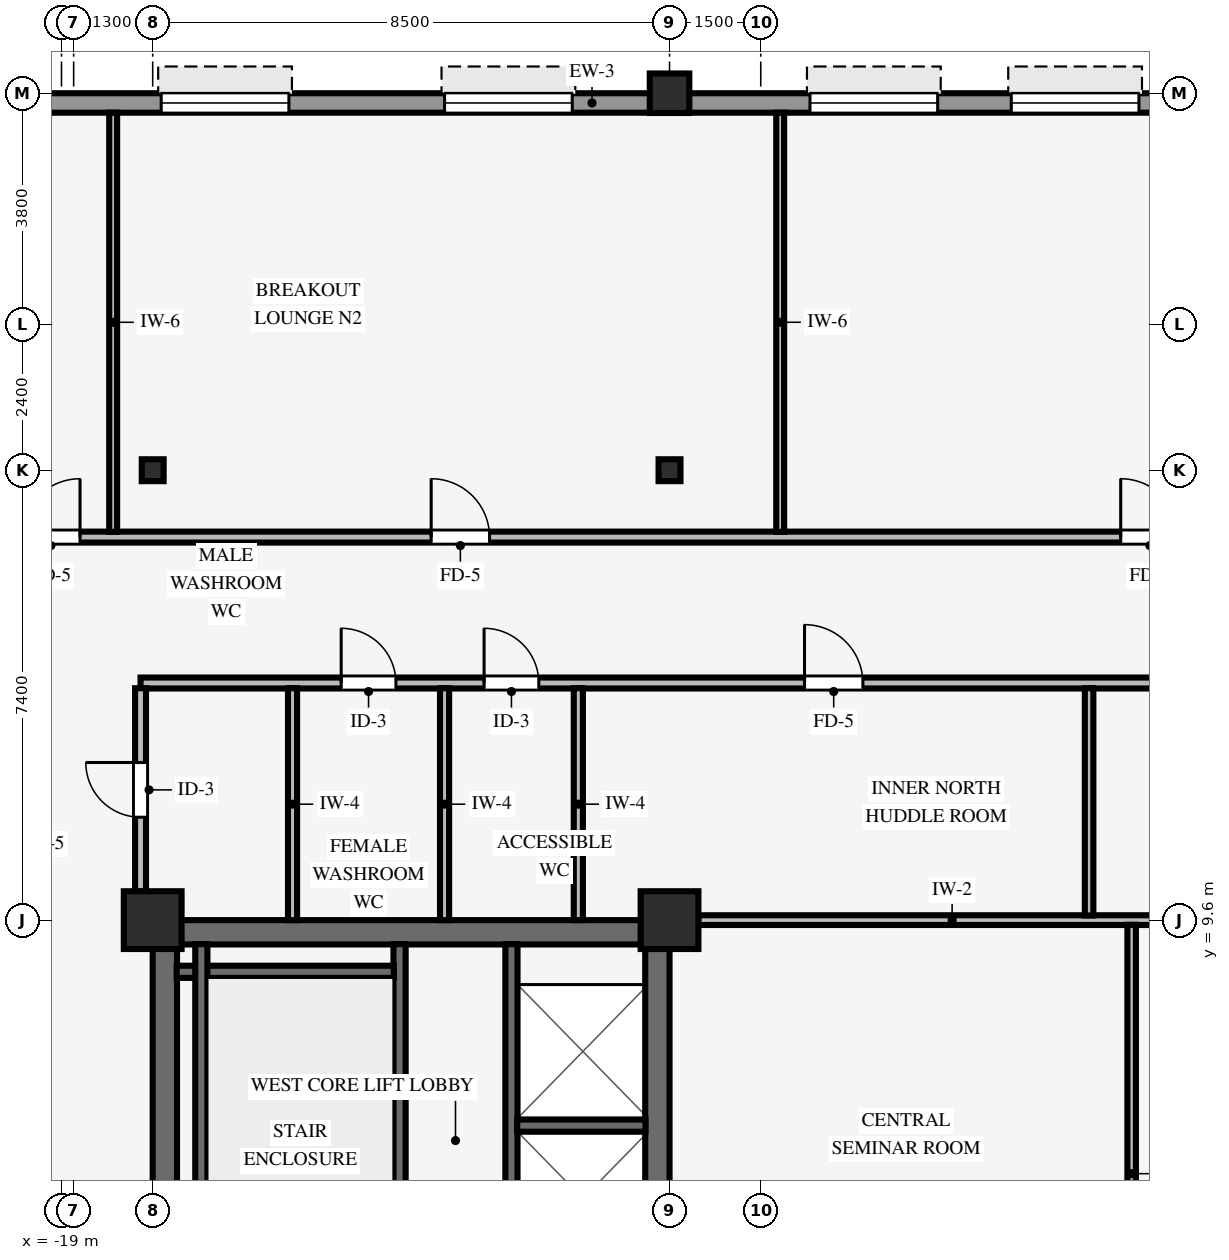
"""IFC4 building model, lengths in metres.
Left out: names, types, materials, properties, quantities, classifications, styles, units other than length and angle.
Written with IfcOpenShell. Run it as: python <this file> out.ifc"""

import sys

from ifc_helpers import new_model, si_unit, direction, frame, frame_2d, origin, origin_2d, place, context, subcontext, project, spatial, rectangle, hollow_rectangle, i_section, extrude, source, transform, mapped, element, fill, save


model = new_model("IFC4")
c1 = context("Model", 3, precision=1e-05, world=origin(), true_north=direction((0.0, 1.0)))
c2 = subcontext(c1, "Body", "Model", "MODEL_VIEW")
j1 = project(units=[si_unit("LENGTHUNIT", "METRE"), si_unit("PLANEANGLEUNIT", "RADIAN")], contexts=[c1])
p1 = place(None, origin())
s1 = spatial("IfcSite", under=j1, at=p1, CompositionType="ELEMENT")
p2 = place(p1, origin())
s2 = spatial("IfcBuilding", under=s1, at=p2, CompositionType="ELEMENT")
p3 = place(p2, frame((0.0, 0.0, 160.35)))
s3 = spatial("IfcBuildingStorey", under=s2, at=p3, CompositionType="ELEMENT", Elevation=160.35)
p4 = place(p3, frame((-17.5, 9.4, 0.0), z_axis=(0.0, 0.0, 1.0), x_axis=(1.0, 0.0, 0.0)))
e1 = element("IfcWall", 1, at=p4, inside=s3, PredefinedType="SHEAR", context=c2, shape_type="SweptSolid", body=[
    extrude(rectangle(XDim=8.5, YDim=0.4, at=frame_2d((4.25, 0.0))), origin(), (0.0, 0.0, 1.0), 3.37),
])
p5 = place(p3, frame((-17.3, -9.205, 0.0), z_axis=(0.0, 0.0, 1.0), x_axis=(0.0, 1.0, 0.0)))
e2 = element("IfcWall", 2, at=p5, inside=s3, PredefinedType="SHEAR", context=c2, shape_type="SweptSolid", body=[
    extrude(rectangle(XDim=18.41, YDim=0.4, at=frame_2d((9.205, 0.0))), origin(), (0.0, 0.0, 1.0), 3.37),
])
p6 = place(p3, frame((-9.2, -9.205, 0.0), z_axis=(0.0, 0.0, 1.0), x_axis=(0.0, 1.0, 0.0)))
e3 = element("IfcWall", 3, at=p6, inside=s3, PredefinedType="SHEAR", context=c2, shape_type="SweptSolid", body=[
    extrude(rectangle(XDim=18.41, YDim=0.4, at=frame_2d((9.205, 0.0))), origin(), (0.0, 0.0, 1.0), 3.37),
])
p7 = place(p6, frame((8.605, 0.0, 0.0)))
e4 = element("IfcOpeningElement", 4, at=p7, cuts=e3, PredefinedType="OPENING", context=c2, shape_type="SweptSolid", body=[
    extrude(rectangle(XDim=1.2, YDim=2.15, at=frame_2d((0.6, 1.075))), frame((0.0, 0.21, 0.0), z_axis=(0.0, -1.0, 0.0), x_axis=(1.0, 0.0, 0.0)), (0.0, 0.0, 1.0), 0.42),
])
for number, where, z_axis, x_axis in (
    (5, (-17.5, 9.6, 0.0), (0.0, 0.0, 1.0), (1.0, 0.0, 0.0)),
    (6, (-9.0, 9.6, 0.0), (0.0, 0.0, 1.0), (1.0, 0.0, 0.0)),
):
    element("IfcColumn", number, at=place(p3, frame(where, z_axis=z_axis, x_axis=x_axis)), inside=s3, PredefinedType="COLUMN", context=c2, shape_type="SweptSolid", body=[
        extrude(rectangle(XDim=0.95, YDim=0.95, at=origin_2d()), origin(), (0.0, 0.0, 1.0), 3.37),
    ])
p8 = place(p3, frame((-9.0, 23.2, 0.0), z_axis=(0.0, 0.0, 1.0), x_axis=(1.0, 0.0, 0.0)))
e7 = element("IfcColumn", 7, at=p8, inside=s3, PredefinedType="COLUMN", context=c2, shape_type="SweptSolid", body=[
    extrude(hollow_rectangle(XDim=0.65, YDim=0.65, WallThickness=0.04, InnerFilletRadius=0.04, OuterFilletRadius=0.08, at=origin_2d()), origin(), (0.0, 0.0, 1.0), 3.37),
])
for number, where, z_axis, x_axis in (
    (8, (-17.5, 17.0, 0.0), (0.0, 0.0, 1.0), (1.0, 0.0, 0.0)),
    (9, (-9.0, 17.0, 0.0), (0.0, 0.0, 1.0), (1.0, 0.0, 0.0)),
):
    element("IfcColumn", number, at=place(p3, frame(where, z_axis=z_axis, x_axis=x_axis)), inside=s3, PredefinedType="COLUMN", context=c2, shape_type="SweptSolid", body=[
        extrude(i_section(OverallWidth=0.36, OverallDepth=0.36, WebThickness=0.021, FlangeThickness=0.021, FilletRadius=0.018, at=origin_2d()), origin(), (0.0, 0.0, 1.0), 3.37),
    ])
p9 = place(p3, frame((-24.3, 23.04, 0.0), z_axis=(0.0, 0.0, 1.0), x_axis=(1.0, 0.0, 0.0)))
e10 = element("IfcWall", 10, at=p9, inside=s3, PredefinedType="STANDARD", context=c2, shape_type="SweptSolid", body=[
    extrude(rectangle(XDim=48.6, YDim=0.32, at=frame_2d((24.3, 0.0))), origin(), (0.0, 0.0, 1.0), 2.705),
])
p10 = place(p9, frame((28.5, 0.0, 0.0)))
e11 = element("IfcOpeningElement", 11, at=p10, cuts=e10, PredefinedType="OPENING", context=c2, shape_type="SweptSolid", body=[
    extrude(rectangle(XDim=1.05, YDim=2.1, at=frame_2d((0.525, 1.05))), frame((0.0, 0.17, 0.0), z_axis=(0.0, -1.0, 0.0), x_axis=(1.0, 0.0, 0.0)), (0.0, 0.0, 1.0), 0.34),
])
p11 = place(p9, frame((2.28, 0.0, 0.8)))
e12 = element("IfcOpeningElement", 12, at=p11, cuts=e10, PredefinedType="OPENING", context=c2, shape_type="SweptSolid", body=[
    extrude(rectangle(XDim=2.1, YDim=1.56, at=frame_2d((1.05, 0.78))), frame((0.0, 0.17, 0.0), z_axis=(0.0, -1.0, 0.0), x_axis=(1.0, 0.0, 0.0)), (0.0, 0.0, 1.0), 0.34),
])
p12 = place(p9, frame((6.94, 0.0, 0.8)))
e13 = element("IfcOpeningElement", 13, at=p12, cuts=e10, PredefinedType="OPENING", context=c2, shape_type="SweptSolid", body=[
    extrude(rectangle(XDim=2.1, YDim=1.56, at=frame_2d((1.05, 0.78))), frame((0.0, 0.17, 0.0), z_axis=(0.0, -1.0, 0.0), x_axis=(1.0, 0.0, 0.0)), (0.0, 0.0, 1.0), 0.34),
])
p13 = place(p9, frame((11.6, 0.0, 0.8)))
e14 = element("IfcOpeningElement", 14, at=p13, cuts=e10, PredefinedType="OPENING", context=c2, shape_type="SweptSolid", body=[
    extrude(rectangle(XDim=2.1, YDim=1.56, at=frame_2d((1.05, 0.78))), frame((0.0, 0.17, 0.0), z_axis=(0.0, -1.0, 0.0), x_axis=(1.0, 0.0, 0.0)), (0.0, 0.0, 1.0), 0.34),
])
p14 = place(p9, frame((17.61, 0.0, 0.8)))
e15 = element("IfcOpeningElement", 15, at=p14, cuts=e10, PredefinedType="OPENING", context=c2, shape_type="SweptSolid", body=[
    extrude(rectangle(XDim=2.1, YDim=1.56, at=frame_2d((1.05, 0.78))), frame((0.0, 0.17, 0.0), z_axis=(0.0, -1.0, 0.0), x_axis=(1.0, 0.0, 0.0)), (0.0, 0.0, 1.0), 0.34),
])
p15 = place(p9, frame((20.92, 0.0, 0.8)))
e16 = element("IfcOpeningElement", 16, at=p15, cuts=e10, PredefinedType="OPENING", context=c2, shape_type="SweptSolid", body=[
    extrude(rectangle(XDim=2.1, YDim=1.56, at=frame_2d((1.05, 0.78))), frame((0.0, 0.17, 0.0), z_axis=(0.0, -1.0, 0.0), x_axis=(1.0, 0.0, 0.0)), (0.0, 0.0, 1.0), 0.34),
])
p16 = place(p9, frame((25.58, 0.0, 0.8)))
e17 = element("IfcOpeningElement", 17, at=p16, cuts=e10, PredefinedType="OPENING", context=c2, shape_type="SweptSolid", body=[
    extrude(rectangle(XDim=2.1, YDim=1.56, at=frame_2d((1.05, 0.78))), frame((0.0, 0.17, 0.0), z_axis=(0.0, -1.0, 0.0), x_axis=(1.0, 0.0, 0.0)), (0.0, 0.0, 1.0), 0.34),
])
p17 = place(p9, frame((34.9, 0.0, 0.8)))
e18 = element("IfcOpeningElement", 18, at=p17, cuts=e10, PredefinedType="OPENING", context=c2, shape_type="SweptSolid", body=[
    extrude(rectangle(XDim=2.1, YDim=1.56, at=frame_2d((1.05, 0.78))), frame((0.0, 0.17, 0.0), z_axis=(0.0, -1.0, 0.0), x_axis=(1.0, 0.0, 0.0)), (0.0, 0.0, 1.0), 0.34),
])
p18 = place(p9, frame((39.56, 0.0, 0.8)))
e19 = element("IfcOpeningElement", 19, at=p18, cuts=e10, PredefinedType="OPENING", context=c2, shape_type="SweptSolid", body=[
    extrude(rectangle(XDim=2.1, YDim=1.56, at=frame_2d((1.05, 0.78))), frame((0.0, 0.17, 0.0), z_axis=(0.0, -1.0, 0.0), x_axis=(1.0, 0.0, 0.0)), (0.0, 0.0, 1.0), 0.34),
])
p19 = place(p9, frame((44.22, 0.0, 0.8)))
e20 = element("IfcOpeningElement", 20, at=p19, cuts=e10, PredefinedType="OPENING", context=c2, shape_type="SweptSolid", body=[
    extrude(rectangle(XDim=2.1, YDim=1.56, at=frame_2d((1.05, 0.78))), frame((0.0, 0.17, 0.0), z_axis=(0.0, -1.0, 0.0), x_axis=(1.0, 0.0, 0.0)), (0.0, 0.0, 1.0), 0.34),
])
p20 = place(p3, frame((-13.44, 0.9, 0.0), z_axis=(0.0, 0.0, 1.0), x_axis=(0.0, 1.0, 0.0)))
e21 = element("IfcWall", 21, at=p20, inside=s3, PredefinedType="SHEAR", context=c2, shape_type="SweptSolid", body=[
    extrude(rectangle(XDim=8.305, YDim=0.2, at=frame_2d((4.153, 0.0))), origin(), (0.0, 0.0, 1.0), 3.37),
])
p21 = place(p20, frame((1.53, 0.0, 0.0), z_axis=(0.0, 0.0, 1.0), x_axis=(-1.0, 0.0, 0.0)))
e22 = element("IfcOpeningElement", 22, at=p21, cuts=e21, PredefinedType="OPENING", context=c2, shape_type="SweptSolid", body=[
    extrude(rectangle(XDim=1.1, YDim=2.15, at=frame_2d((0.55, 1.075))), frame((0.0, 0.11, 0.0), z_axis=(0.0, -1.0, 0.0), x_axis=(1.0, 0.0, 0.0)), (0.0, 0.0, 1.0), 0.22),
])
p22 = place(p3, frame((-17.105, 8.75, 0.0), z_axis=(0.0, 0.0, 1.0), x_axis=(1.0, 0.0, 0.0)))
e23 = element("IfcWall", 23, at=p22, inside=s3, PredefinedType="SHEAR", context=c2, shape_type="SweptSolid", body=[
    extrude(rectangle(XDim=3.57, YDim=0.2, at=frame_2d((1.785, 0.0))), origin(), (0.0, 0.0, 1.0), 3.37),
])
p23 = place(p3, frame((-16.7, 1.095, 0.0), z_axis=(0.0, 0.0, 1.0), x_axis=(0.0, 1.0, 0.0)))
e24 = element("IfcWall", 24, at=p23, inside=s3, PredefinedType="SHEAR", context=c2, shape_type="SweptSolid", body=[
    extrude(rectangle(XDim=8.11, YDim=0.2, at=frame_2d((4.055, 0.0))), origin(), (0.0, 0.0, 1.0), 3.37),
])
p24 = place(p3, frame((-11.6, 1.3, 0.0), z_axis=(0.0, 0.0, 1.0), x_axis=(0.0, 1.0, 0.0)))
e25 = element("IfcWall", 25, at=p24, inside=s3, PredefinedType="SHEAR", context=c2, shape_type="SweptSolid", body=[
    extrude(rectangle(XDim=7.905, YDim=0.2, at=frame_2d((3.953, 0.0))), origin(), (0.0, 0.0, 1.0), 3.37),
])
p25 = place(p3, frame((-11.505, 6.22, 0.0), z_axis=(0.0, 0.0, 1.0), x_axis=(1.0, 0.0, 0.0)))
e26 = element("IfcWall", 26, at=p25, inside=s3, PredefinedType="SHEAR", context=c2, shape_type="SweptSolid", body=[
    extrude(rectangle(XDim=2.11, YDim=0.2, at=frame_2d((1.055, 0.0))), origin(), (0.0, 0.0, 1.0), 3.37),
])
p26 = place(p3, frame((-8.529, 9.6, 0.0), z_axis=(0.0, 0.0, 1.0), x_axis=(1.0, 0.0, 0.0)))
e27 = element("IfcWall", 27, at=p26, inside=s3, PredefinedType="PARTITIONING", context=c2, shape_type="SweptSolid", body=[
    extrude(rectangle(XDim=8.353, YDim=0.16, at=frame_2d((4.177, 0.0))), origin(), (0.0, 0.0, 1.0), 2.405),
])
p27 = place(p3, frame((-17.7, 13.5, 0.0), z_axis=(0.0, 0.0, 1.0), x_axis=(1.0, 0.0, 0.0)))
e28 = element("IfcWall", 28, at=p27, inside=s3, PredefinedType="PARTITIONING", context=c2, shape_type="SweptSolid", body=[
    extrude(rectangle(XDim=24.3, YDim=0.18, at=frame_2d((12.15, 0.0))), origin(), (0.0, 0.0, 1.0), 2.998),
])
p28 = place(p27, frame((19.47, 0.0, 0.0)))
e29 = element("IfcOpeningElement", 29, at=p28, cuts=e28, PredefinedType="OPENING", context=c2, shape_type="SweptSolid", body=[
    extrude(rectangle(XDim=0.96, YDim=2.1, at=frame_2d((0.48, 1.05))), frame((0.0, 0.1, 0.0), z_axis=(0.0, -1.0, 0.0), x_axis=(1.0, 0.0, 0.0)), (0.0, 0.0, 1.0), 0.2),
])
p29 = place(p27, frame((10.92, 0.0, 0.0)))
e30 = element("IfcOpeningElement", 30, at=p29, cuts=e28, PredefinedType="OPENING", context=c2, shape_type="SweptSolid", body=[
    extrude(rectangle(XDim=0.96, YDim=2.1, at=frame_2d((0.48, 1.05))), frame((0.0, 0.1, 0.0), z_axis=(0.0, -1.0, 0.0), x_axis=(1.0, 0.0, 0.0)), (0.0, 0.0, 1.0), 0.2),
])
p30 = place(p27, frame((3.3, 0.0, 0.0)))
e31 = element("IfcOpeningElement", 31, at=p30, cuts=e28, PredefinedType="OPENING", context=c2, shape_type="SweptSolid", body=[
    extrude(rectangle(XDim=0.9, YDim=2.1, at=frame_2d((0.45, 1.05))), frame((0.0, 0.1, 0.0), z_axis=(0.0, -1.0, 0.0), x_axis=(1.0, 0.0, 0.0)), (0.0, 0.0, 1.0), 0.2),
])
p31 = place(p27, frame((5.65, 0.0, 0.0)))
e32 = element("IfcOpeningElement", 32, at=p31, cuts=e28, PredefinedType="OPENING", context=c2, shape_type="SweptSolid", body=[
    extrude(rectangle(XDim=0.9, YDim=2.1, at=frame_2d((0.45, 1.05))), frame((0.0, 0.1, 0.0), z_axis=(0.0, -1.0, 0.0), x_axis=(1.0, 0.0, 0.0)), (0.0, 0.0, 1.0), 0.2),
])
p32 = place(p3, frame((-26.08, 15.9, 0.0), z_axis=(0.0, 0.0, 1.0), x_axis=(1.0, 0.0, 0.0)))
e33 = element("IfcWall", 33, at=p32, inside=s3, PredefinedType="PARTITIONING", context=c2, shape_type="SweptSolid", body=[
    extrude(rectangle(XDim=52.16, YDim=0.18, at=frame_2d((26.08, 0.0))), origin(), (0.0, 0.0, 1.0), 3.36),
])
p33 = place(p32, frame((24.5, 0.0, 0.0)))
e34 = element("IfcOpeningElement", 34, at=p33, cuts=e33, PredefinedType="OPENING", context=c2, shape_type="SweptSolid", body=[
    extrude(rectangle(XDim=0.96, YDim=2.1, at=frame_2d((0.48, 1.05))), frame((0.0, 0.1, 0.0), z_axis=(0.0, -1.0, 0.0), x_axis=(1.0, 0.0, 0.0)), (0.0, 0.0, 1.0), 0.2),
])
p34 = place(p32, frame((40.5, 0.0, 0.0)))
e35 = element("IfcOpeningElement", 35, at=p34, cuts=e33, PredefinedType="OPENING", context=c2, shape_type="SweptSolid", body=[
    extrude(rectangle(XDim=0.96, YDim=2.1, at=frame_2d((0.48, 1.05))), frame((0.0, 0.1, 0.0), z_axis=(0.0, -1.0, 0.0), x_axis=(1.0, 0.0, 0.0)), (0.0, 0.0, 1.0), 0.2),
])
p35 = place(p32, frame((13.16, 0.0, 0.0)))
e36 = element("IfcOpeningElement", 36, at=p35, cuts=e33, PredefinedType="OPENING", context=c2, shape_type="SweptSolid", body=[
    extrude(rectangle(XDim=0.96, YDim=2.1, at=frame_2d((0.48, 1.05))), frame((0.0, 0.1, 0.0), z_axis=(0.0, -1.0, 0.0), x_axis=(1.0, 0.0, 0.0)), (0.0, 0.0, 1.0), 0.2),
])
p36 = place(p32, frame((6.425, 0.0, 0.0)))
e37 = element("IfcOpeningElement", 37, at=p36, cuts=e33, PredefinedType="OPENING", context=c2, shape_type="SweptSolid", body=[
    extrude(rectangle(XDim=0.96, YDim=2.1, at=frame_2d((0.48, 1.05))), frame((0.0, 0.1, 0.0), z_axis=(0.0, -1.0, 0.0), x_axis=(1.0, 0.0, 0.0)), (0.0, 0.0, 1.0), 0.2),
])
p37 = place(p3, frame((-18.15, 15.986, 0.0), z_axis=(0.0, 0.0, 1.0), x_axis=(0.0, 1.0, 0.0)))
e38 = element("IfcWall", 38, at=p37, inside=s3, PredefinedType="PARTITIONING", context=c2, shape_type="SweptSolid", body=[
    extrude(rectangle(XDim=6.894, YDim=0.13, at=frame_2d((3.447, 0.0))), origin(), (0.0, 0.0, 1.0), 3.36),
])
p38 = place(p3, frame((-17.7, 10.071, 0.0), z_axis=(0.0, 0.0, 1.0), x_axis=(0.0, 1.0, 0.0)))
e39 = element("IfcWall", 39, at=p38, inside=s3, PredefinedType="PARTITIONING", context=c2, shape_type="SweptSolid", body=[
    extrude(rectangle(XDim=3.343, YDim=0.18, at=frame_2d((1.671, 0.0))), origin(), (0.0, 0.0, 1.0), 2.816),
])
p39 = place(p38, frame((1.221, 0.0, 0.0)))
e40 = element("IfcOpeningElement", 40, at=p39, cuts=e39, PredefinedType="OPENING", context=c2, shape_type="SweptSolid", body=[
    extrude(rectangle(XDim=0.9, YDim=2.1, at=frame_2d((0.45, 1.05))), frame((0.0, 0.1, 0.0), z_axis=(0.0, -1.0, 0.0), x_axis=(1.0, 0.0, 0.0)), (0.0, 0.0, 1.0), 0.2),
])
for number, where, z_axis, x_axis in (
    (41, (-15.2, 9.6, 0.0), (0.0, 0.0, 1.0), (0.0, 1.0, 0.0)),
    (42, (-12.7, 9.6, 0.0), (0.0, 0.0, 1.0), (0.0, 1.0, 0.0)),
    (43, (-10.5, 9.6, 0.0), (0.0, 0.0, 1.0), (0.0, 1.0, 0.0)),
):
    element("IfcWall", number, at=place(p3, frame(where, z_axis=z_axis, x_axis=x_axis)), inside=s3, PredefinedType="PARTITIONING", context=c2, shape_type="SweptSolid", body=[
        extrude(rectangle(XDim=3.814, YDim=0.15, at=frame_2d((1.907, 0.0))), origin(), (0.0, 0.0, 1.0), 3.36),
    ])
p40 = place(p3, frame((-7.18, 15.986, 0.0), z_axis=(0.0, 0.0, 1.0), x_axis=(0.0, 1.0, 0.0)))
e44 = element("IfcWall", 44, at=p40, inside=s3, PredefinedType="PARTITIONING", context=c2, shape_type="SweptSolid", body=[
    extrude(rectangle(XDim=6.894, YDim=0.13, at=frame_2d((3.447, 0.0))), origin(), (0.0, 0.0, 1.0), 3.36),
])
p41 = place(p3, frame((-2.1, 9.676, 0.0), z_axis=(0.0, 0.0, 1.0), x_axis=(0.0, 1.0, 0.0)))
e45 = element("IfcWall", 45, at=p41, inside=s3, PredefinedType="PARTITIONING", context=c2, shape_type="SweptSolid", body=[
    extrude(rectangle(XDim=3.738, YDim=0.14, at=frame_2d((1.869, 0.0))), origin(), (0.0, 0.0, 1.0), 3.36),
])
p42 = place(p3, frame((-1.4, 1.336, 0.0), z_axis=(0.0, 0.0, 1.0), x_axis=(0.0, 1.0, 0.0)))
e46 = element("IfcWall", 46, at=p42, inside=s3, PredefinedType="PARTITIONING", context=c2, shape_type="SweptSolid", body=[
    extrude(rectangle(XDim=8.188, YDim=0.14, at=frame_2d((4.094, 0.0))), origin(), (0.0, 0.0, 1.0), 3.36),
])
m1 = source(origin(), c2, "Body", "SweptSolid", [
    extrude(rectangle(XDim=2.1, YDim=1.56, at=frame_2d((1.05, 0.78))), frame((0.0, 0.03, 0.0), z_axis=(0.0, -1.0, 0.0), x_axis=(1.0, 0.0, 0.0)), (0.0, 0.0, 1.0), 0.06),
])
p43 = place(p12, origin())
e47 = element("IfcWindow", 47, at=p43, inside=s3, PartitioningType="SINGLE_PANEL", PredefinedType="WINDOW", context=c2, shape_type="MappedRepresentation", body=[
    mapped(m1, transform((0.0, 0.0, 0.0), scale=1.0)),
])
fill(e13, e47)
p44 = place(p13, origin())
e48 = element("IfcWindow", 48, at=p44, inside=s3, PartitioningType="SINGLE_PANEL", PredefinedType="WINDOW", context=c2, shape_type="MappedRepresentation", body=[
    mapped(m1, transform((0.0, 0.0, 0.0), scale=1.0)),
])
fill(e14, e48)
p45 = place(p14, origin())
e49 = element("IfcWindow", 49, at=p45, inside=s3, PartitioningType="SINGLE_PANEL", PredefinedType="WINDOW", context=c2, shape_type="MappedRepresentation", body=[
    mapped(m1, transform((0.0, 0.0, 0.0), scale=1.0)),
])
fill(e15, e49)
p46 = place(p15, origin())
e50 = element("IfcWindow", 50, at=p46, inside=s3, PartitioningType="SINGLE_PANEL", PredefinedType="WINDOW", context=c2, shape_type="MappedRepresentation", body=[
    mapped(m1, transform((0.0, 0.0, 0.0), scale=1.0)),
])
fill(e16, e50)
m2 = source(origin(), c2, "Body", "SweptSolid", [
    extrude(rectangle(XDim=0.96, YDim=2.1, at=frame_2d((0.48, 1.05))), frame((0.0, 0.025, 0.0), z_axis=(0.0, -1.0, 0.0), x_axis=(1.0, 0.0, 0.0)), (0.0, 0.0, 1.0), 0.05),
])
p47 = place(p33, origin())
e51 = element("IfcDoor", 51, at=p47, inside=s3, OperationType="SINGLE_SWING_LEFT", PredefinedType="DOOR", context=c2, shape_type="MappedRepresentation", body=[
    mapped(m2, transform((0.0, 0.0, 0.0), scale=1.0)),
])
fill(e34, e51)
p48 = place(p35, origin())
e52 = element("IfcDoor", 52, at=p48, inside=s3, OperationType="SINGLE_SWING_LEFT", PredefinedType="DOOR", context=c2, shape_type="MappedRepresentation", body=[
    mapped(m2, transform((0.0, 0.0, 0.0), scale=1.0)),
])
fill(e36, e52)
p49 = place(p29, origin())
e53 = element("IfcDoor", 53, at=p49, inside=s3, OperationType="SINGLE_SWING_LEFT", PredefinedType="DOOR", context=c2, shape_type="MappedRepresentation", body=[
    mapped(m2, transform((0.0, 0.0, 0.0), scale=1.0)),
])
fill(e30, e53)
m3 = source(origin(), c2, "Body", "SweptSolid", [
    extrude(rectangle(XDim=0.9, YDim=2.1, at=frame_2d((0.45, 1.05))), frame((0.0, 0.025, 0.0), z_axis=(0.0, -1.0, 0.0), x_axis=(1.0, 0.0, 0.0)), (0.0, 0.0, 1.0), 0.05),
])
p50 = place(p39, origin())
e54 = element("IfcDoor", 54, at=p50, inside=s3, OperationType="SINGLE_SWING_RIGHT", PredefinedType="DOOR", context=c2, shape_type="MappedRepresentation", body=[
    mapped(m3, transform((0.0, 0.0, 0.0), scale=1.0)),
])
fill(e40, e54)
p51 = place(p30, origin())
e55 = element("IfcDoor", 55, at=p51, inside=s3, OperationType="SINGLE_SWING_LEFT", PredefinedType="DOOR", context=c2, shape_type="MappedRepresentation", body=[
    mapped(m3, transform((0.0, 0.0, 0.0), scale=1.0)),
])
fill(e31, e55)
p52 = place(p31, origin())
e56 = element("IfcDoor", 56, at=p52, inside=s3, OperationType="SINGLE_SWING_LEFT", PredefinedType="DOOR", context=c2, shape_type="MappedRepresentation", body=[
    mapped(m3, transform((0.0, 0.0, 0.0), scale=1.0)),
])
fill(e32, e56)
p53 = place(p36, origin())
e57 = element("IfcDoor", 57, at=p53, inside=s3, OperationType="SINGLE_SWING_RIGHT", PredefinedType="DOOR", context=c2, shape_type="MappedRepresentation", body=[
    mapped(m2, transform((0.0, 0.0, 0.0), scale=1.0)),
])
fill(e37, e57)
save(model, sys.argv[1])
